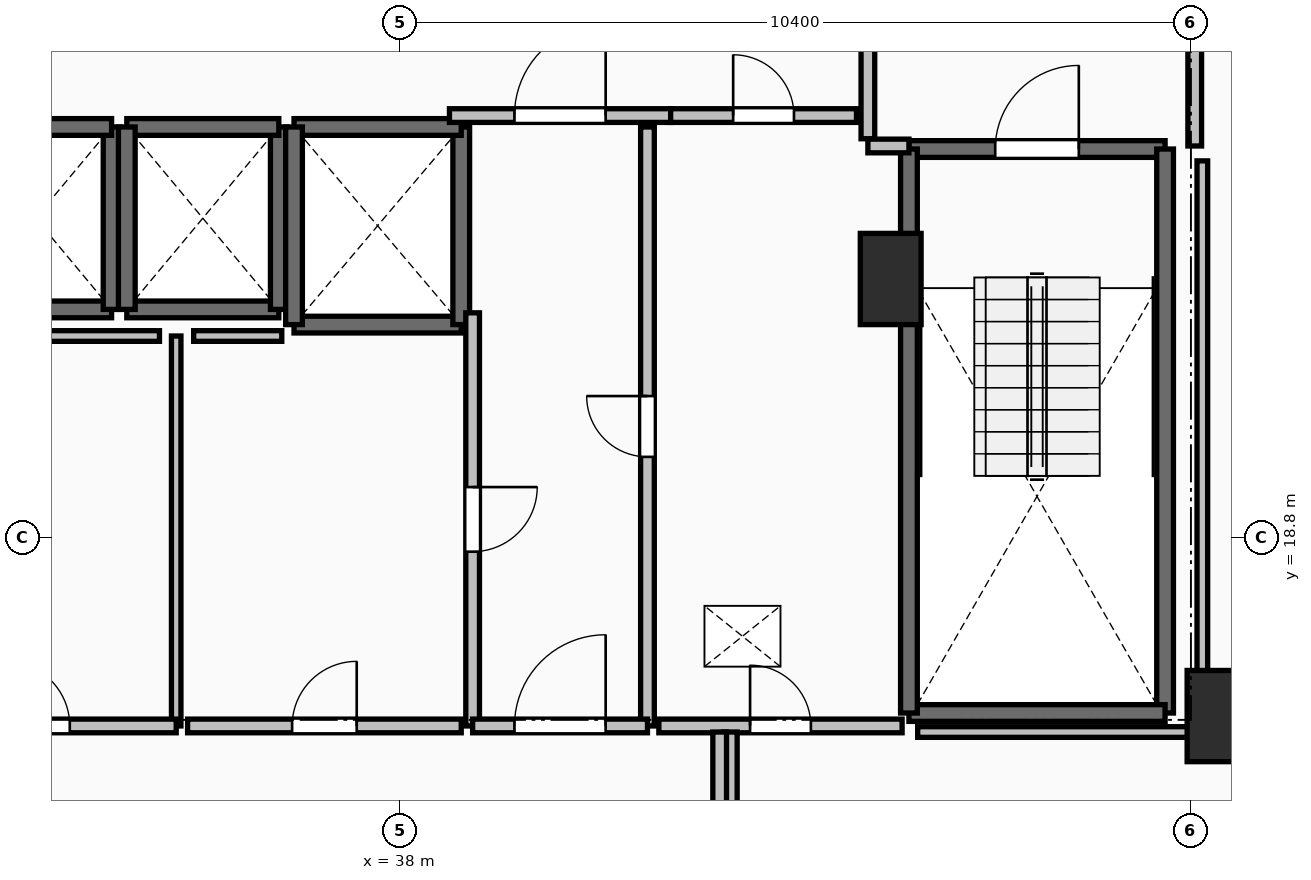
"""IFC4 building model, lengths in metres.
Left out: names, types, materials, properties, quantities, classifications, styles, units other than length and angle.
Written with IfcOpenShell. Run it as: python <this file> out.ifc"""

import sys

from ifc_helpers import new_model, si_unit, direction, frame, frame_2d, origin, origin_2d, place, context, subcontext, project, spatial, rectangle, extrude, element, fill, save


model = new_model("IFC4")
c1 = context("Model", 3, precision=1e-05, world=origin(), true_north=direction((0.0, 1.0)))
c2 = subcontext(c1, "Body", "Model", "MODEL_VIEW")
j1 = project(units=[si_unit("LENGTHUNIT", "METRE"), si_unit("PLANEANGLEUNIT", "RADIAN")], contexts=[c1])
p1 = place(None, origin())
s1 = spatial("IfcSite", under=j1, at=p1, CompositionType="ELEMENT")
p2 = place(p1, origin())
s2 = spatial("IfcBuilding", under=s1, at=p2, CompositionType="ELEMENT")
p3 = place(p2, frame((0.0, 0.0, 31.0)))
s3 = spatial("IfcBuildingStorey", under=s2, at=p3, CompositionType="ELEMENT", Elevation=31.0)
for number, where, z_axis, x_axis in (
    (1, (48.75, 16.45, 0.0), (0.0, 0.0, 1.0), (1.0, 0.0, 0.0)),
    (2, (44.45, 22.2, 0.0), (0.0, 0.0, 1.0), (1.0, 0.0, 0.0)),
):
    element("IfcColumn", number, at=place(p3, frame(where, z_axis=z_axis, x_axis=x_axis)), inside=s3, PredefinedType="PILASTER", context=c2, shape_type="SweptSolid", body=[
        extrude(rectangle(XDim=0.8, YDim=1.2, at=origin_2d()), origin(), (0.0, 0.0, 1.0), 3.5),
    ])
p4 = place(p3, frame((44.69, 23.91, 0.0), z_axis=(0.0, 0.0, 1.0), x_axis=(1.0, 0.0, 0.0)))
e3 = element("IfcWall", 3, at=p4, inside=s3, PredefinedType="SOLIDWALL", context=c2, shape_type="SweptSolid", body=[
    extrude(rectangle(XDim=3.37, YDim=0.22, at=frame_2d((1.685, 0.0))), origin(), (0.0, 0.0, 1.0), 3.24),
])
p5 = place(p4, frame((1.135, 0.0, 0.0)))
e4 = element("IfcOpeningElement", 4, at=p5, cuts=e3, PredefinedType="OPENING", context=c2, shape_type="SweptSolid", body=[
    extrude(rectangle(XDim=1.1, YDim=2.15, at=frame_2d((0.55, 1.075))), frame((0.0, 0.125, 0.0), z_axis=(0.0, -1.0, 0.0), x_axis=(1.0, 0.0, 0.0)), (0.0, 0.0, 1.0), 0.25),
])
p6 = place(p3, frame((48.06, 23.91, 0.0), z_axis=(0.0, 0.0, 1.0), x_axis=(0.0, -1.0, 0.0)))
e5 = element("IfcWall", 5, at=p6, inside=s3, PredefinedType="SOLIDWALL", context=c2, shape_type="SweptSolid", body=[
    extrude(rectangle(XDim=7.42, YDim=0.22, at=frame_2d((3.71, 0.0))), origin(), (0.0, 0.0, 1.0), 3.24),
])
p7 = place(p3, frame((48.06, 16.49, 0.0), z_axis=(0.0, 0.0, 1.0), x_axis=(-1.0, 0.0, 0.0)))
e6 = element("IfcWall", 6, at=p7, inside=s3, PredefinedType="SOLIDWALL", context=c2, shape_type="SweptSolid", body=[
    extrude(rectangle(XDim=3.37, YDim=0.22, at=frame_2d((1.685, 0.0))), origin(), (0.0, 0.0, 1.0), 3.24),
])
p8 = place(p3, frame((44.69, 16.49, 0.0), z_axis=(0.0, 0.0, 1.0), x_axis=(0.0, 1.0, 0.0)))
e7 = element("IfcWall", 7, at=p8, inside=s3, PredefinedType="SOLIDWALL", context=c2, shape_type="SweptSolid", body=[
    extrude(rectangle(XDim=7.42, YDim=0.22, at=frame_2d((3.71, 0.0))), origin(), (0.0, 0.0, 1.0), 3.24),
])
p9 = place(p3, frame((32.2, 21.8, 0.0), z_axis=(0.0, 0.0, 1.0), x_axis=(1.0, 0.0, 0.0)))
e8 = element("IfcWall", 8, at=p9, inside=s3, PredefinedType="SOLIDWALL", context=c2, shape_type="SweptSolid", body=[
    extrude(rectangle(XDim=2.0, YDim=0.22, at=frame_2d((1.0, 0.0))), origin(), (0.0, 0.0, 1.0), 3.24),
])
p10 = place(p3, frame((34.2, 21.8, 0.0), z_axis=(0.0, 0.0, 1.0), x_axis=(0.0, 1.0, 0.0)))
e9 = element("IfcWall", 9, at=p10, inside=s3, PredefinedType="SOLIDWALL", context=c2, shape_type="SweptSolid", body=[
    extrude(rectangle(XDim=2.4, YDim=0.22, at=frame_2d((1.2, 0.0))), origin(), (0.0, 0.0, 1.0), 3.24),
])
for number, where, z_axis, x_axis in (
    (10, (34.2, 24.2, 0.0), (0.0, 0.0, 1.0), (-1.0, 0.0, 0.0)),
    (11, (34.4, 21.8, 0.0), (0.0, 0.0, 1.0), (1.0, 0.0, 0.0)),
):
    element("IfcWall", number, at=place(p3, frame(where, z_axis=z_axis, x_axis=x_axis)), inside=s3, PredefinedType="SOLIDWALL", context=c2, shape_type="SweptSolid", body=[
        extrude(rectangle(XDim=2.0, YDim=0.22, at=frame_2d((1.0, 0.0))), origin(), (0.0, 0.0, 1.0), 3.24),
    ])
p11 = place(p3, frame((36.4, 21.8, 0.0), z_axis=(0.0, 0.0, 1.0), x_axis=(0.0, 1.0, 0.0)))
e12 = element("IfcWall", 12, at=p11, inside=s3, PredefinedType="SOLIDWALL", context=c2, shape_type="SweptSolid", body=[
    extrude(rectangle(XDim=2.4, YDim=0.22, at=frame_2d((1.2, 0.0))), origin(), (0.0, 0.0, 1.0), 3.24),
])
p12 = place(p3, frame((36.4, 24.2, 0.0), z_axis=(0.0, 0.0, 1.0), x_axis=(-1.0, 0.0, 0.0)))
e13 = element("IfcWall", 13, at=p12, inside=s3, PredefinedType="SOLIDWALL", context=c2, shape_type="SweptSolid", body=[
    extrude(rectangle(XDim=2.0, YDim=0.22, at=frame_2d((1.0, 0.0))), origin(), (0.0, 0.0, 1.0), 3.24),
])
p13 = place(p3, frame((34.4, 24.2, 0.0), z_axis=(0.0, 0.0, 1.0), x_axis=(0.0, -1.0, 0.0)))
e14 = element("IfcWall", 14, at=p13, inside=s3, PredefinedType="SOLIDWALL", context=c2, shape_type="SweptSolid", body=[
    extrude(rectangle(XDim=2.4, YDim=0.22, at=frame_2d((1.2, 0.0))), origin(), (0.0, 0.0, 1.0), 3.24),
])
p14 = place(p3, frame((36.6, 21.6, 0.0), z_axis=(0.0, 0.0, 1.0), x_axis=(1.0, 0.0, 0.0)))
e15 = element("IfcWall", 15, at=p14, inside=s3, PredefinedType="SOLIDWALL", context=c2, shape_type="SweptSolid", body=[
    extrude(rectangle(XDim=2.2, YDim=0.22, at=frame_2d((1.1, 0.0))), origin(), (0.0, 0.0, 1.0), 3.24),
])
p15 = place(p3, frame((38.8, 21.6, 0.0), z_axis=(0.0, 0.0, 1.0), x_axis=(0.0, 1.0, 0.0)))
e16 = element("IfcWall", 16, at=p15, inside=s3, PredefinedType="SOLIDWALL", context=c2, shape_type="SweptSolid", body=[
    extrude(rectangle(XDim=2.6, YDim=0.22, at=frame_2d((1.3, 0.0))), origin(), (0.0, 0.0, 1.0), 3.24),
])
p16 = place(p3, frame((38.8, 24.2, 0.0), z_axis=(0.0, 0.0, 1.0), x_axis=(-1.0, 0.0, 0.0)))
e17 = element("IfcWall", 17, at=p16, inside=s3, PredefinedType="SOLIDWALL", context=c2, shape_type="SweptSolid", body=[
    extrude(rectangle(XDim=2.2, YDim=0.22, at=frame_2d((1.1, 0.0))), origin(), (0.0, 0.0, 1.0), 3.24),
])
p17 = place(p3, frame((36.6, 24.2, 0.0), z_axis=(0.0, 0.0, 1.0), x_axis=(0.0, -1.0, 0.0)))
e18 = element("IfcWall", 18, at=p17, inside=s3, PredefinedType="SOLIDWALL", context=c2, shape_type="SweptSolid", body=[
    extrude(rectangle(XDim=2.6, YDim=0.22, at=frame_2d((1.3, 0.0))), origin(), (0.0, 0.0, 1.0), 3.24),
])
p18 = place(p3, frame((44.15, 27.955, 0.0), z_axis=(0.0, 0.0, 1.0), x_axis=(0.0, -1.0, 0.0)))
e19 = element("IfcWall", 19, at=p18, inside=s3, PredefinedType="PARTITIONING", context=c2, shape_type="SweptSolid", body=[
    extrude(rectangle(XDim=3.91, YDim=0.18, at=frame_2d((1.955, 0.0))), origin(), (0.0, 0.0, 1.0), 3.24),
])
p19 = place(p18, frame((1.355, 0.0, 0.0)))
e20 = element("IfcOpeningElement", 20, at=p19, cuts=e19, PredefinedType="OPENING", context=c2, shape_type="SweptSolid", body=[
    extrude(rectangle(XDim=1.2, YDim=2.15, at=frame_2d((0.6, 1.075))), frame((0.0, 0.105, 0.0), z_axis=(0.0, -1.0, 0.0), x_axis=(1.0, 0.0, 0.0)), (0.0, 0.0, 1.0), 0.21),
])
p20 = place(p3, frame((44.15, 23.95, 0.0), z_axis=(0.0, 0.0, 1.0), x_axis=(1.0, 0.0, 0.0)))
e21 = element("IfcWall", 21, at=p20, inside=s3, PredefinedType="PARTITIONING", context=c2, shape_type="SweptSolid", body=[
    extrude(rectangle(XDim=0.54, YDim=0.18, at=frame_2d((0.27, 0.0))), origin(), (0.0, 0.0, 1.0), 3.24),
])
p21 = place(p3, frame((48.45, 23.95, 0.0), z_axis=(0.0, 0.0, 1.0), x_axis=(0.0, 1.0, 0.0)))
e22 = element("IfcWall", 22, at=p21, inside=s3, PredefinedType="PARTITIONING", context=c2, shape_type="SweptSolid", body=[
    extrude(rectangle(XDim=4.05, YDim=0.18, at=frame_2d((2.025, 0.0))), origin(), (0.0, 0.0, 1.0), 3.24),
])
p22 = place(p21, frame((1.425, 0.0, 0.0)))
e23 = element("IfcOpeningElement", 23, at=p22, cuts=e22, PredefinedType="OPENING", context=c2, shape_type="SweptSolid", body=[
    extrude(rectangle(XDim=1.2, YDim=2.15, at=frame_2d((0.6, 1.075))), frame((0.0, 0.105, 0.0), z_axis=(0.0, -1.0, 0.0), x_axis=(1.0, 0.0, 0.0)), (0.0, 0.0, 1.0), 0.21),
])
p23 = place(p3, frame((38.645, 24.35, 0.0), z_axis=(0.0, 0.0, 1.0), x_axis=(1.0, 0.0, 0.0)))
e24 = element("IfcWall", 24, at=p23, inside=s3, PredefinedType="PARTITIONING", context=c2, shape_type="SweptSolid", body=[
    extrude(rectangle(XDim=2.91, YDim=0.18, at=frame_2d((1.455, 0.0))), origin(), (0.0, 0.0, 1.0), 3.24),
])
p24 = place(p23, frame((0.855, 0.0, 0.0)))
e25 = element("IfcOpeningElement", 25, at=p24, cuts=e24, PredefinedType="OPENING", context=c2, shape_type="SweptSolid", body=[
    extrude(rectangle(XDim=1.2, YDim=2.15, at=frame_2d((0.6, 1.075))), frame((0.0, 0.105, 0.0), z_axis=(0.0, -1.0, 0.0), x_axis=(1.0, 0.0, 0.0)), (0.0, 0.0, 1.0), 0.21),
])
p25 = place(p3, frame((41.555, 24.35, 0.0), z_axis=(0.0, 0.0, 1.0), x_axis=(1.0, 0.0, 0.0)))
e26 = element("IfcWall", 26, at=p25, inside=s3, PredefinedType="PARTITIONING", context=c2, shape_type="SweptSolid", body=[
    extrude(rectangle(XDim=2.445, YDim=0.18, at=frame_2d((1.223, 0.0))), origin(), (0.0, 0.0, 1.0), 3.24),
])
p26 = place(p25, frame((0.823, 0.0, 0.0)))
e27 = element("IfcOpeningElement", 27, at=p26, cuts=e26, PredefinedType="OPENING", context=c2, shape_type="SweptSolid", body=[
    extrude(rectangle(XDim=0.8, YDim=2.05, at=frame_2d((0.4, 1.025))), frame((0.0, 0.105, 0.0), z_axis=(0.0, -1.0, 0.0), x_axis=(1.0, 0.0, 0.0)), (0.0, 0.0, 1.0), 0.21),
])
p27 = place(p3, frame((41.25, 16.32, 0.0), z_axis=(0.0, 0.0, 1.0), x_axis=(0.0, 1.0, 0.0)))
e28 = element("IfcWall", 28, at=p27, inside=s3, PredefinedType="PARTITIONING", context=c2, shape_type="SweptSolid", body=[
    extrude(rectangle(XDim=7.88, YDim=0.18, at=frame_2d((3.94, 0.0))), origin(), (0.0, 0.0, 1.0), 3.24),
])
p28 = place(p27, frame((3.54, 0.0, 0.0)))
e29 = element("IfcOpeningElement", 29, at=p28, cuts=e28, PredefinedType="OPENING", context=c2, shape_type="SweptSolid", body=[
    extrude(rectangle(XDim=0.8, YDim=2.05, at=frame_2d((0.4, 1.025))), frame((0.0, 0.105, 0.0), z_axis=(0.0, -1.0, 0.0), x_axis=(1.0, 0.0, 0.0)), (0.0, 0.0, 1.0), 0.21),
])
p29 = place(p3, frame((38.95, 21.755, 0.0), z_axis=(0.0, 0.0, 1.0), x_axis=(0.0, -1.0, 0.0)))
e30 = element("IfcWall", 30, at=p29, inside=s3, PredefinedType="PARTITIONING", context=c2, shape_type="SweptSolid", body=[
    extrude(rectangle(XDim=5.435, YDim=0.18, at=frame_2d((2.717, 0.0))), origin(), (0.0, 0.0, 1.0), 3.24),
])
p30 = place(p29, frame((2.292, 0.0, 0.0)))
e31 = element("IfcOpeningElement", 31, at=p30, cuts=e30, PredefinedType="OPENING", context=c2, shape_type="SweptSolid", body=[
    extrude(rectangle(XDim=0.85, YDim=2.1, at=frame_2d((0.425, 1.05))), frame((0.0, 0.105, 0.0), z_axis=(0.0, -1.0, 0.0), x_axis=(1.0, 0.0, 0.0)), (0.0, 0.0, 1.0), 0.21),
])
p31 = place(p3, frame((38.95, 16.32, 0.0), z_axis=(0.0, 0.0, 1.0), x_axis=(1.0, 0.0, 0.0)))
e32 = element("IfcWall", 32, at=p31, inside=s3, PredefinedType="PARTITIONING", context=c2, shape_type="SweptSolid", body=[
    extrude(rectangle(XDim=2.3, YDim=0.18, at=frame_2d((1.15, 0.0))), origin(), (0.0, 0.0, 1.0), 3.24),
])
p32 = place(p31, frame((0.55, 0.0, 0.0)))
e33 = element("IfcOpeningElement", 33, at=p32, cuts=e32, PredefinedType="OPENING", context=c2, shape_type="SweptSolid", body=[
    extrude(rectangle(XDim=1.2, YDim=2.15, at=frame_2d((0.6, 1.075))), frame((0.0, 0.105, 0.0), z_axis=(0.0, -1.0, 0.0), x_axis=(1.0, 0.0, 0.0)), (0.0, 0.0, 1.0), 0.21),
])
p33 = place(p3, frame((41.4, 16.32, 0.0), z_axis=(0.0, 0.0, 1.0), x_axis=(1.0, 0.0, 0.0)))
e34 = element("IfcWall", 34, at=p33, inside=s3, PredefinedType="PARTITIONING", context=c2, shape_type="SweptSolid", body=[
    extrude(rectangle(XDim=3.2, YDim=0.18, at=frame_2d((1.6, 0.0))), origin(), (0.0, 0.0, 1.0), 3.24),
])
p34 = place(p33, frame((1.2, 0.0, 0.0)))
e35 = element("IfcOpeningElement", 35, at=p34, cuts=e34, PredefinedType="OPENING", context=c2, shape_type="SweptSolid", body=[
    extrude(rectangle(XDim=0.8, YDim=2.05, at=frame_2d((0.4, 1.025))), frame((0.0, 0.105, 0.0), z_axis=(0.0, -1.0, 0.0), x_axis=(1.0, 0.0, 0.0)), (0.0, 0.0, 1.0), 0.21),
])
p35 = place(p3, frame((35.05, 16.32, 0.0), z_axis=(0.0, 0.0, 1.0), x_axis=(0.0, 1.0, 0.0)))
e36 = element("IfcWall", 36, at=p35, inside=s3, PredefinedType="PARTITIONING", context=c2, shape_type="SweptSolid", body=[
    extrude(rectangle(XDim=5.13, YDim=0.125, at=frame_2d((2.565, 0.0))), origin(), (0.0, 0.0, 1.0), 3.24),
])
p36 = place(p3, frame((31.4, 16.32, 0.0), z_axis=(0.0, 0.0, 1.0), x_axis=(1.0, 0.0, 0.0)))
e37 = element("IfcWall", 37, at=p36, inside=s3, PredefinedType="PARTITIONING", context=c2, shape_type="SweptSolid", body=[
    extrude(rectangle(XDim=3.65, YDim=0.18, at=frame_2d((1.825, 0.0))), origin(), (0.0, 0.0, 1.0), 3.24),
])
p37 = place(p36, frame((1.4, 0.0, 0.0)))
e38 = element("IfcOpeningElement", 38, at=p37, cuts=e37, PredefinedType="OPENING", context=c2, shape_type="SweptSolid", body=[
    extrude(rectangle(XDim=0.85, YDim=2.1, at=frame_2d((0.425, 1.05))), frame((0.0, 0.105, 0.0), z_axis=(0.0, -1.0, 0.0), x_axis=(1.0, 0.0, 0.0)), (0.0, 0.0, 1.0), 0.21),
])
p38 = place(p3, frame((35.2, 16.32, 0.0), z_axis=(0.0, 0.0, 1.0), x_axis=(1.0, 0.0, 0.0)))
e39 = element("IfcWall", 39, at=p38, inside=s3, PredefinedType="PARTITIONING", context=c2, shape_type="SweptSolid", body=[
    extrude(rectangle(XDim=3.6, YDim=0.18, at=frame_2d((1.8, 0.0))), origin(), (0.0, 0.0, 1.0), 3.24),
])
p39 = place(p38, frame((1.375, 0.0, 0.0)))
e40 = element("IfcOpeningElement", 40, at=p39, cuts=e39, PredefinedType="OPENING", context=c2, shape_type="SweptSolid", body=[
    extrude(rectangle(XDim=0.85, YDim=2.1, at=frame_2d((0.425, 1.05))), frame((0.0, 0.105, 0.0), z_axis=(0.0, -1.0, 0.0), x_axis=(1.0, 0.0, 0.0)), (0.0, 0.0, 1.0), 0.21),
])
p40 = place(p3, frame((42.34, 16.24, 0.0), z_axis=(0.0, 0.0, 1.0), x_axis=(0.0, -1.0, 0.0)))
e41 = element("IfcWall", 41, at=p40, inside=s3, PredefinedType="PARTITIONING", context=c2, shape_type="SweptSolid", body=[
    extrude(rectangle(XDim=2.14, YDim=0.18, at=frame_2d((1.07, 0.0))), origin(), (0.0, 0.0, 1.0), 3.24),
])
p41 = place(p3, frame((42.2, 14.157, 0.0), z_axis=(0.0, 0.0, 1.0), x_axis=(0.0, 1.0, 0.0)))
e42 = element("IfcWall", 42, at=p41, inside=s3, PredefinedType="PARTITIONING", context=c2, shape_type="SweptSolid", body=[
    extrude(rectangle(XDim=2.083, YDim=0.18, at=frame_2d((1.042, 0.0))), origin(), (0.0, 0.0, 1.0), 3.24),
])
p42 = place(p3, frame((34.83, 21.45, 0.0), z_axis=(0.0, 0.0, 1.0), x_axis=(-1.0, 0.0, 0.0)))
e43 = element("IfcWall", 43, at=p42, inside=s3, PredefinedType="PARTITIONING", context=c2, shape_type="SweptSolid", body=[
    extrude(rectangle(XDim=3.3, YDim=0.14, at=frame_2d((1.65, 0.0))), origin(), (0.0, 0.0, 1.0), 3.24),
])
p43 = place(p3, frame((36.439, 21.45, 0.0), z_axis=(0.0, 0.0, 1.0), x_axis=(-1.0, 0.0, 0.0)))
e44 = element("IfcWall", 44, at=p43, inside=s3, PredefinedType="PARTITIONING", context=c2, shape_type="SweptSolid", body=[
    extrude(rectangle(XDim=1.159, YDim=0.14, at=frame_2d((0.58, 0.0))), origin(), (0.0, 0.0, 1.0), 3.24),
])
p44 = place(p3, frame((48.55, 23.754, 0.0), z_axis=(0.0, 0.0, 1.0), x_axis=(0.0, -1.0, 0.0)))
e45 = element("IfcWall", 45, at=p44, inside=s3, PredefinedType="PARTITIONING", context=c2, shape_type="SweptSolid", body=[
    extrude(rectangle(XDim=7.514, YDim=0.14, at=frame_2d((3.757, 0.0))), origin(), (0.0, 0.0, 1.0), 2.432),
])
p45 = place(p3, frame((48.55, 16.24, 0.0), z_axis=(0.0, 0.0, 1.0), x_axis=(-1.0, 0.0, 0.0)))
e46 = element("IfcWall", 46, at=p45, inside=s3, PredefinedType="PARTITIONING", context=c2, shape_type="SweptSolid", body=[
    extrude(rectangle(XDim=3.745, YDim=0.14, at=frame_2d((1.873, 0.0))), origin(), (0.0, 0.0, 1.0), 2.432),
])
p46 = place(p5, origin())
e47 = element("IfcDoor", 47, at=p46, inside=s3, OperationType="SINGLE_SWING_RIGHT", PredefinedType="DOOR", context=c2, shape_type="SweptSolid", body=[
    extrude(rectangle(XDim=1.1, YDim=2.15, at=frame_2d((0.55, 1.075))), frame((0.0, 0.025, 0.0), z_axis=(0.0, -1.0, 0.0), x_axis=(1.0, 0.0, 0.0)), (0.0, 0.0, 1.0), 0.05),
])
fill(e4, e47)
p47 = place(p24, origin())
e48 = element("IfcDoor", 48, at=p47, inside=s3, OperationType="SINGLE_SWING_RIGHT", PredefinedType="DOOR", context=c2, shape_type="SweptSolid", body=[
    extrude(rectangle(XDim=1.2, YDim=2.15, at=frame_2d((0.6, 1.075))), frame((0.0, 0.025, 0.0), z_axis=(0.0, -1.0, 0.0), x_axis=(1.0, 0.0, 0.0)), (0.0, 0.0, 1.0), 0.05),
])
fill(e25, e48)
p48 = place(p26, origin())
e49 = element("IfcDoor", 49, at=p48, inside=s3, OperationType="SINGLE_SWING_LEFT", PredefinedType="DOOR", context=c2, shape_type="SweptSolid", body=[
    extrude(rectangle(XDim=0.8, YDim=2.05, at=frame_2d((0.4, 1.025))), frame((0.0, 0.025, 0.0), z_axis=(0.0, -1.0, 0.0), x_axis=(1.0, 0.0, 0.0)), (0.0, 0.0, 1.0), 0.05),
])
fill(e27, e49)
p49 = place(p28, origin())
e50 = element("IfcDoor", 50, at=p49, inside=s3, OperationType="SINGLE_SWING_RIGHT", PredefinedType="DOOR", context=c2, shape_type="SweptSolid", body=[
    extrude(rectangle(XDim=0.8, YDim=2.05, at=frame_2d((0.4, 1.025))), frame((0.0, 0.025, 0.0), z_axis=(0.0, -1.0, 0.0), x_axis=(1.0, 0.0, 0.0)), (0.0, 0.0, 1.0), 0.05),
])
fill(e29, e50)
p50 = place(p30, origin())
e51 = element("IfcDoor", 51, at=p50, inside=s3, OperationType="SINGLE_SWING_LEFT", PredefinedType="DOOR", context=c2, shape_type="SweptSolid", body=[
    extrude(rectangle(XDim=0.85, YDim=2.1, at=frame_2d((0.425, 1.05))), frame((0.0, 0.025, 0.0), z_axis=(0.0, -1.0, 0.0), x_axis=(1.0, 0.0, 0.0)), (0.0, 0.0, 1.0), 0.05),
])
fill(e31, e51)
p51 = place(p32, origin())
e52 = element("IfcDoor", 52, at=p51, inside=s3, OperationType="SINGLE_SWING_RIGHT", PredefinedType="DOOR", context=c2, shape_type="SweptSolid", body=[
    extrude(rectangle(XDim=1.2, YDim=2.15, at=frame_2d((0.6, 1.075))), frame((0.0, 0.025, 0.0), z_axis=(0.0, -1.0, 0.0), x_axis=(1.0, 0.0, 0.0)), (0.0, 0.0, 1.0), 0.05),
])
fill(e33, e52)
p52 = place(p34, origin())
e53 = element("IfcDoor", 53, at=p52, inside=s3, OperationType="SINGLE_SWING_LEFT", PredefinedType="DOOR", context=c2, shape_type="SweptSolid", body=[
    extrude(rectangle(XDim=0.8, YDim=2.05, at=frame_2d((0.4, 1.025))), frame((0.0, 0.025, 0.0), z_axis=(0.0, -1.0, 0.0), x_axis=(1.0, 0.0, 0.0)), (0.0, 0.0, 1.0), 0.05),
])
fill(e35, e53)
p53 = place(p37, origin())
e54 = element("IfcDoor", 54, at=p53, inside=s3, OperationType="SINGLE_SWING_LEFT", PredefinedType="DOOR", context=c2, shape_type="SweptSolid", body=[
    extrude(rectangle(XDim=0.85, YDim=2.1, at=frame_2d((0.425, 1.05))), frame((0.0, 0.025, 0.0), z_axis=(0.0, -1.0, 0.0), x_axis=(1.0, 0.0, 0.0)), (0.0, 0.0, 1.0), 0.05),
])
fill(e38, e54)
p54 = place(p39, origin())
e55 = element("IfcDoor", 55, at=p54, inside=s3, OperationType="SINGLE_SWING_RIGHT", PredefinedType="DOOR", context=c2, shape_type="SweptSolid", body=[
    extrude(rectangle(XDim=0.85, YDim=2.1, at=frame_2d((0.425, 1.05))), frame((0.0, 0.025, 0.0), z_axis=(0.0, -1.0, 0.0), x_axis=(1.0, 0.0, 0.0)), (0.0, 0.0, 1.0), 0.05),
])
fill(e40, e55)
save(model, sys.argv[1])
